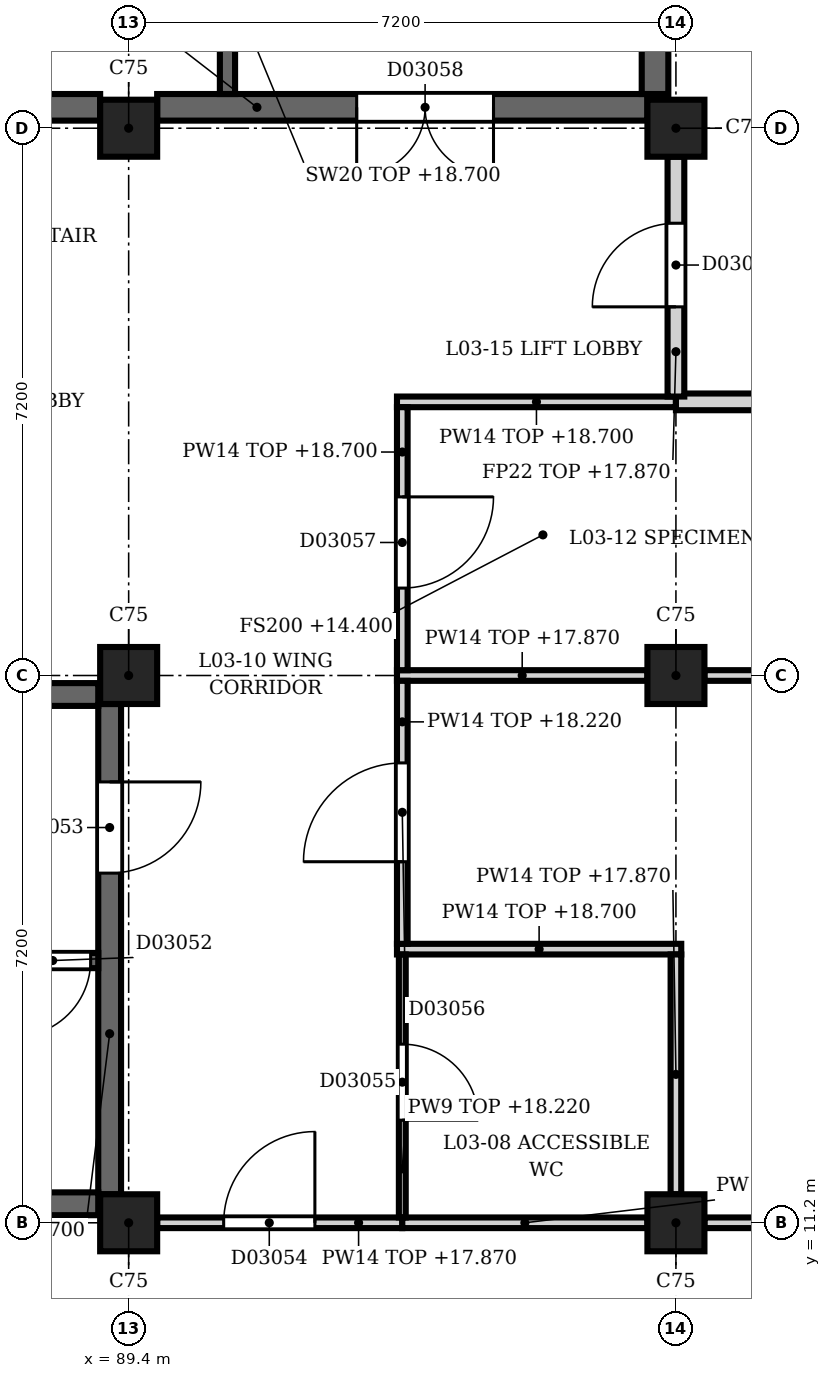
"""IFC4 building model, lengths in metres.
Left out: names, types, materials, properties, quantities, classifications, styles, units other than length and angle.
Written with IfcOpenShell. Run it as: python <this file> out.ifc"""

import sys

from ifc_helpers import new_model, si_unit, direction, frame, frame_2d, origin, origin_2d, place, context, subcontext, project, spatial, rectangle, extrude, element, fill, save


model = new_model("IFC4")
c1 = context("Model", 3, precision=1e-05, world=origin(), true_north=direction((0.0, 1.0)))
c2 = subcontext(c1, "Body", "Model", "MODEL_VIEW")
j1 = project(units=[si_unit("LENGTHUNIT", "METRE"), si_unit("PLANEANGLEUNIT", "RADIAN")], contexts=[c1])
p1 = place(None, origin())
s1 = spatial("IfcSite", under=j1, at=p1, CompositionType="ELEMENT")
p2 = place(p1, origin())
s2 = spatial("IfcBuilding", under=s1, at=p2, CompositionType="ELEMENT")
p3 = place(p2, frame((0.0, 0.0, 14.4)))
s3 = spatial("IfcBuildingStorey", under=s2, at=p3, CompositionType="ELEMENT", Elevation=14.4)
for number, where, z_axis, x_axis in (
    (1, (89.4, 11.2, 0.0), (0.0, 0.0, 1.0), (1.0, 0.0, 0.0)),
    (2, (89.4, 18.4, 0.0), (0.0, 0.0, 1.0), (1.0, 0.0, 0.0)),
    (3, (89.4, 25.6, 0.0), (0.0, 0.0, 1.0), (1.0, 0.0, 0.0)),
    (4, (96.6, 11.2, 0.0), (0.0, 0.0, 1.0), (1.0, 0.0, 0.0)),
    (5, (96.6, 18.4, 0.0), (0.0, 0.0, 1.0), (1.0, 0.0, 0.0)),
    (6, (96.6, 25.6, 0.0), (0.0, 0.0, 1.0), (1.0, 0.0, 0.0)),
):
    element("IfcColumn", number, at=place(p3, frame(where, z_axis=z_axis, x_axis=x_axis)), inside=s3, PredefinedType="COLUMN", context=c2, shape_type="SweptSolid", body=[
        extrude(rectangle(XDim=0.75, YDim=0.75, at=origin_2d()), origin(), (0.0, 0.0, 1.0), 4.5),
    ])
p4 = place(p3, frame((82.575, 25.875, 0.0), z_axis=(0.0, 0.0, 1.0), x_axis=(1.0, 0.0, 0.0)))
e7 = element("IfcWall", 7, at=p4, inside=s3, PredefinedType="SHEAR", context=c2, shape_type="SweptSolid", body=[
    extrude(rectangle(XDim=6.45, YDim=0.35, at=frame_2d((3.225, 0.0))), origin(), (0.0, 0.0, 1.0), 4.3),
])
p5 = place(p4, frame((3.825, 0.0, 0.0)))
e8 = element("IfcOpeningElement", 8, at=p5, cuts=e7, PredefinedType="OPENING", context=c2, shape_type="SweptSolid", body=[
    extrude(rectangle(XDim=1.2, YDim=2.1, at=frame_2d((0.6, 1.05))), frame((0.0, 0.185, 0.0), z_axis=(0.0, -1.0, 0.0), x_axis=(1.0, 0.0, 0.0)), (0.0, 0.0, 1.0), 0.37),
])
p6 = place(p3, frame((89.775, 25.875, 0.0), z_axis=(0.0, 0.0, 1.0), x_axis=(1.0, 0.0, 0.0)))
e9 = element("IfcWall", 9, at=p6, inside=s3, PredefinedType="SHEAR", context=c2, shape_type="SweptSolid", body=[
    extrude(rectangle(XDim=6.45, YDim=0.35, at=frame_2d((3.225, 0.0))), origin(), (0.0, 0.0, 1.0), 4.3),
])
p7 = place(p6, frame((2.625, 0.0, 0.0)))
e10 = element("IfcOpeningElement", 10, at=p7, cuts=e9, PredefinedType="OPENING", context=c2, shape_type="SweptSolid", body=[
    extrude(rectangle(XDim=1.8, YDim=2.1, at=frame_2d((0.9, 1.05))), frame((0.0, 0.185, 0.0), z_axis=(0.0, -1.0, 0.0), x_axis=(1.0, 0.0, 0.0)), (0.0, 0.0, 1.0), 0.37),
])
p8 = place(p3, frame((96.325, 26.05, 0.0), z_axis=(0.0, 0.0, 1.0), x_axis=(0.0, 1.0, 0.0)))
e11 = element("IfcWall", 11, at=p8, inside=s3, PredefinedType="SHEAR", context=c2, shape_type="SweptSolid", body=[
    extrude(rectangle(XDim=6.3, YDim=0.35, at=frame_2d((3.15, 0.0))), origin(), (0.0, 0.0, 1.0), 4.3),
])
p9 = place(p3, frame((90.7, 26.05, 0.0), z_axis=(0.0, 0.0, 1.0), x_axis=(0.0, 1.0, 0.0)))
e12 = element("IfcWall", 12, at=p9, inside=s3, PredefinedType="SHEAR", context=c2, shape_type="SweptSolid", body=[
    extrude(rectangle(XDim=3.05, YDim=0.2, at=frame_2d((1.525, 0.0))), origin(), (0.0, 0.0, 1.0), 4.3),
])
p10 = place(p3, frame((89.15, 11.575, 0.0), z_axis=(0.0, 0.0, 1.0), x_axis=(0.0, 1.0, 0.0)))
e13 = element("IfcWall", 13, at=p10, inside=s3, PredefinedType="SHEAR", context=c2, shape_type="SweptSolid", body=[
    extrude(rectangle(XDim=6.45, YDim=0.3, at=frame_2d((3.225, 0.0))), origin(), (0.0, 0.0, 1.0), 4.3),
])
p11 = place(p10, frame((4.225, 0.0, 0.0)))
e14 = element("IfcOpeningElement", 14, at=p11, cuts=e13, PredefinedType="OPENING", context=c2, shape_type="SweptSolid", body=[
    extrude(rectangle(XDim=1.2, YDim=2.1, at=frame_2d((0.6, 1.05))), frame((0.0, 0.16, 0.0), z_axis=(0.0, -1.0, 0.0), x_axis=(1.0, 0.0, 0.0)), (0.0, 0.0, 1.0), 0.32),
])
for number, where, z_axis, x_axis in (
    (15, (82.6, 11.45, 0.0), (0.0, 0.0, 1.0), (1.0, 0.0, 0.0)),
    (16, (82.6, 18.15, 0.0), (0.0, 0.0, 1.0), (1.0, 0.0, 0.0)),
):
    element("IfcWall", number, at=place(p3, frame(where, z_axis=z_axis, x_axis=x_axis)), inside=s3, PredefinedType="SHEAR", context=c2, shape_type="SweptSolid", body=[
        extrude(rectangle(XDim=6.4, YDim=0.3, at=frame_2d((3.2, 0.0))), origin(), (0.0, 0.0, 1.0), 4.3),
    ])
p12 = place(p3, frame((89.0, 14.65, 0.0), z_axis=(0.0, 0.0, 1.0), x_axis=(-1.0, 0.0, 0.0)))
e17 = element("IfcWall", 17, at=p12, inside=s3, PredefinedType="SHEAR", context=c2, shape_type="SweptSolid", body=[
    extrude(rectangle(XDim=6.4, YDim=0.2, at=frame_2d((3.2, 0.0))), origin(), (0.0, 0.0, 1.0), 4.3),
])
p13 = place(p12, frame((0.1, 0.0, 0.0)))
e18 = element("IfcOpeningElement", 18, at=p13, cuts=e17, PredefinedType="OPENING", context=c2, shape_type="SweptSolid", body=[
    extrude(rectangle(XDim=1.0, YDim=2.1, at=frame_2d((0.5, 1.05))), frame((0.0, 0.11, 0.0), z_axis=(0.0, -1.0, 0.0), x_axis=(1.0, 0.0, 0.0)), (0.0, 0.0, 1.0), 0.22),
])
p14 = place(p3, frame((93.0, 11.2, 0.0), z_axis=(0.0, 0.0, 1.0), x_axis=(-1.0, 0.0, 0.0)))
e19 = element("IfcWall", 19, at=p14, inside=s3, PredefinedType="PARTITIONING", context=c2, shape_type="SweptSolid", body=[
    extrude(rectangle(XDim=3.225, YDim=0.14, at=frame_2d((1.613, 0.0))), origin(), (0.0, 0.0, 1.0), 3.47),
])
p15 = place(p14, frame((1.15, 0.0, 0.0)))
e20 = element("IfcOpeningElement", 20, at=p15, cuts=e19, PredefinedType="OPENING", context=c2, shape_type="SweptSolid", body=[
    extrude(rectangle(XDim=1.2, YDim=2.1, at=frame_2d((0.6, 1.05))), frame((0.0, 0.08, 0.0), z_axis=(0.0, -1.0, 0.0), x_axis=(1.0, 0.0, 0.0)), (0.0, 0.0, 1.0), 0.16),
])
p16 = place(p3, frame((93.0, 11.2, 0.0), z_axis=(0.0, 0.0, 1.0), x_axis=(1.0, 0.0, 0.0)))
e21 = element("IfcWall", 21, at=p16, inside=s3, PredefinedType="PARTITIONING", context=c2, shape_type="SweptSolid", body=[
    extrude(rectangle(XDim=3.225, YDim=0.14, at=frame_2d((1.613, 0.0))), origin(), (0.0, 0.0, 1.0), 3.47),
])
p17 = place(p3, frame((96.975, 11.2, 0.0), z_axis=(0.0, 0.0, 1.0), x_axis=(1.0, 0.0, 0.0)))
e22 = element("IfcWall", 22, at=p17, inside=s3, PredefinedType="PARTITIONING", context=c2, shape_type="SweptSolid", body=[
    extrude(rectangle(XDim=6.475, YDim=0.14, at=frame_2d((3.237, 0.0))), origin(), (0.0, 0.0, 1.0), 3.47),
])
p18 = place(p3, frame((92.93, 14.8, 0.0), z_axis=(0.0, 0.0, 1.0), x_axis=(1.0, 0.0, 0.0)))
e23 = element("IfcWall", 23, at=p18, inside=s3, PredefinedType="PARTITIONING", context=c2, shape_type="SweptSolid", body=[
    extrude(rectangle(XDim=3.74, YDim=0.14, at=frame_2d((1.87, 0.0))), origin(), (0.0, 0.0, 1.0), 4.3),
])
p19 = place(p3, frame((92.93, 18.4, 0.0), z_axis=(0.0, 0.0, 1.0), x_axis=(1.0, 0.0, 0.0)))
e24 = element("IfcWall", 24, at=p19, inside=s3, PredefinedType="PARTITIONING", context=c2, shape_type="SweptSolid", body=[
    extrude(rectangle(XDim=3.295, YDim=0.14, at=frame_2d((1.647, 0.0))), origin(), (0.0, 0.0, 1.0), 3.47),
])
p20 = place(p3, frame((96.975, 18.4, 0.0), z_axis=(0.0, 0.0, 1.0), x_axis=(1.0, 0.0, 0.0)))
e25 = element("IfcWall", 25, at=p20, inside=s3, PredefinedType="PARTITIONING", context=c2, shape_type="SweptSolid", body=[
    extrude(rectangle(XDim=6.475, YDim=0.14, at=frame_2d((3.237, 0.0))), origin(), (0.0, 0.0, 1.0), 3.47),
])
p21 = place(p3, frame((92.93, 22.0, 0.0), z_axis=(0.0, 0.0, 1.0), x_axis=(1.0, 0.0, 0.0)))
e26 = element("IfcWall", 26, at=p21, inside=s3, PredefinedType="PARTITIONING", context=c2, shape_type="SweptSolid", body=[
    extrude(rectangle(XDim=3.67, YDim=0.14, at=frame_2d((1.835, 0.0))), origin(), (0.0, 0.0, 1.0), 4.3),
])
p22 = place(p3, frame((96.6, 22.0, 0.0), z_axis=(0.0, 0.0, 1.0), x_axis=(1.0, 0.0, 0.0)))
e27 = element("IfcWall", 27, at=p22, inside=s3, PredefinedType="PARTITIONING", context=c2, shape_type="SweptSolid", body=[
    extrude(rectangle(XDim=7.1, YDim=0.22, at=frame_2d((3.55, 0.0))), origin(), (0.0, 0.0, 1.0), 4.3),
])
p23 = place(p3, frame((93.0, 14.73, 0.0), z_axis=(0.0, 0.0, 1.0), x_axis=(0.0, -1.0, 0.0)))
e28 = element("IfcWall", 28, at=p23, inside=s3, PredefinedType="PARTITIONING", context=c2, shape_type="SweptSolid", body=[
    extrude(rectangle(XDim=3.46, YDim=0.09, at=frame_2d((1.73, 0.0))), origin(), (0.0, 0.0, 1.0), 3.82),
])
p24 = place(p23, frame((1.18, 0.0, 0.0)))
e29 = element("IfcOpeningElement", 29, at=p24, cuts=e28, PredefinedType="OPENING", context=c2, shape_type="SweptSolid", body=[
    extrude(rectangle(XDim=1.0, YDim=2.2, at=frame_2d((0.5, 1.1))), frame((0.0, 0.055, 0.0), z_axis=(0.0, -1.0, 0.0), x_axis=(1.0, 0.0, 0.0)), (0.0, 0.0, 1.0), 0.11),
])
p25 = place(p3, frame((93.0, 18.33, 0.0), z_axis=(0.0, 0.0, 1.0), x_axis=(0.0, -1.0, 0.0)))
e30 = element("IfcWall", 30, at=p25, inside=s3, PredefinedType="PARTITIONING", context=c2, shape_type="SweptSolid", body=[
    extrude(rectangle(XDim=3.46, YDim=0.14, at=frame_2d((1.73, 0.0))), origin(), (0.0, 0.0, 1.0), 3.82),
])
p26 = place(p25, frame((1.08, 0.0, 0.0)))
e31 = element("IfcOpeningElement", 31, at=p26, cuts=e30, PredefinedType="OPENING", context=c2, shape_type="SweptSolid", body=[
    extrude(rectangle(XDim=1.3, YDim=2.1, at=frame_2d((0.65, 1.05))), frame((0.0, 0.08, 0.0), z_axis=(0.0, -1.0, 0.0), x_axis=(1.0, 0.0, 0.0)), (0.0, 0.0, 1.0), 0.16),
])
p27 = place(p3, frame((93.0, 21.93, 0.0), z_axis=(0.0, 0.0, 1.0), x_axis=(0.0, -1.0, 0.0)))
e32 = element("IfcWall", 32, at=p27, inside=s3, PredefinedType="PARTITIONING", context=c2, shape_type="SweptSolid", body=[
    extrude(rectangle(XDim=3.46, YDim=0.14, at=frame_2d((1.73, 0.0))), origin(), (0.0, 0.0, 1.0), 4.3),
])
p28 = place(p27, frame((1.18, 0.0, 0.0)))
e33 = element("IfcOpeningElement", 33, at=p28, cuts=e32, PredefinedType="OPENING", context=c2, shape_type="SweptSolid", body=[
    extrude(rectangle(XDim=1.2, YDim=2.1, at=frame_2d((0.6, 1.05))), frame((0.0, 0.08, 0.0), z_axis=(0.0, -1.0, 0.0), x_axis=(1.0, 0.0, 0.0)), (0.0, 0.0, 1.0), 0.16),
])
p29 = place(p3, frame((96.6, 11.575, 0.0), z_axis=(0.0, 0.0, 1.0), x_axis=(0.0, 1.0, 0.0)))
e34 = element("IfcWall", 34, at=p29, inside=s3, PredefinedType="PARTITIONING", context=c2, shape_type="SweptSolid", body=[
    extrude(rectangle(XDim=3.155, YDim=0.14, at=frame_2d((1.578, 0.0))), origin(), (0.0, 0.0, 1.0), 3.47),
])
p30 = place(p3, frame((96.6, 25.225, 0.0), z_axis=(0.0, 0.0, 1.0), x_axis=(0.0, -1.0, 0.0)))
e35 = element("IfcWall", 35, at=p30, inside=s3, PredefinedType="PARTITIONING", context=c2, shape_type="SweptSolid", body=[
    extrude(rectangle(XDim=3.155, YDim=0.22, at=frame_2d((1.578, 0.0))), origin(), (0.0, 0.0, 1.0), 3.47),
])
p31 = place(p30, frame((0.875, 0.0, 0.0)))
e36 = element("IfcOpeningElement", 36, at=p31, cuts=e35, PredefinedType="OPENING", context=c2, shape_type="SweptSolid", body=[
    extrude(rectangle(XDim=1.1, YDim=2.3, at=frame_2d((0.55, 1.15))), frame((0.0, 0.12, 0.0), z_axis=(0.0, -1.0, 0.0), x_axis=(1.0, 0.0, 0.0)), (0.0, 0.0, 1.0), 0.24),
])
p32 = place(p7, origin())
e37 = element("IfcDoor", 37, at=p32, inside=s3, OperationType="SINGLE_SWING_LEFT", PredefinedType="DOOR", context=c2, shape_type="SweptSolid", body=[
    extrude(rectangle(XDim=1.8, YDim=2.1, at=frame_2d((0.9, 1.05))), frame((0.0, 0.025, 0.0), z_axis=(0.0, -1.0, 0.0), x_axis=(1.0, 0.0, 0.0)), (0.0, 0.0, 1.0), 0.05),
])
fill(e10, e37)
p33 = place(p11, origin())
e38 = element("IfcDoor", 38, at=p33, inside=s3, OperationType="SINGLE_SWING_RIGHT", PredefinedType="DOOR", context=c2, shape_type="SweptSolid", body=[
    extrude(rectangle(XDim=1.2, YDim=2.1, at=frame_2d((0.6, 1.05))), frame((0.0, 0.025, 0.0), z_axis=(0.0, -1.0, 0.0), x_axis=(1.0, 0.0, 0.0)), (0.0, 0.0, 1.0), 0.05),
])
fill(e14, e38)
p34 = place(p13, origin())
e39 = element("IfcDoor", 39, at=p34, inside=s3, OperationType="SINGLE_SWING_LEFT", PredefinedType="DOOR", context=c2, shape_type="SweptSolid", body=[
    extrude(rectangle(XDim=1.0, YDim=2.1, at=frame_2d((0.5, 1.05))), frame((0.0, 0.025, 0.0), z_axis=(0.0, -1.0, 0.0), x_axis=(1.0, 0.0, 0.0)), (0.0, 0.0, 1.0), 0.05),
])
fill(e18, e39)
p35 = place(p15, origin())
e40 = element("IfcDoor", 40, at=p35, inside=s3, OperationType="SINGLE_SWING_RIGHT", PredefinedType="DOOR", context=c2, shape_type="SweptSolid", body=[
    extrude(rectangle(XDim=1.2, YDim=2.1, at=frame_2d((0.6, 1.05))), frame((0.0, 0.025, 0.0), z_axis=(0.0, -1.0, 0.0), x_axis=(1.0, 0.0, 0.0)), (0.0, 0.0, 1.0), 0.05),
])
fill(e20, e40)
p36 = place(p24, origin())
e41 = element("IfcDoor", 41, at=p36, inside=s3, OperationType="SINGLE_SWING_LEFT", PredefinedType="DOOR", context=c2, shape_type="SweptSolid", body=[
    extrude(rectangle(XDim=1.0, YDim=2.2, at=frame_2d((0.5, 1.1))), frame((0.0, 0.025, 0.0), z_axis=(0.0, -1.0, 0.0), x_axis=(1.0, 0.0, 0.0)), (0.0, 0.0, 1.0), 0.05),
])
fill(e29, e41)
p37 = place(p26, origin())
e42 = element("IfcDoor", 42, at=p37, inside=s3, OperationType="SINGLE_SWING_LEFT", PredefinedType="DOOR", context=c2, shape_type="SweptSolid", body=[
    extrude(rectangle(XDim=1.3, YDim=2.1, at=frame_2d((0.65, 1.05))), frame((0.0, 0.025, 0.0), z_axis=(0.0, -1.0, 0.0), x_axis=(1.0, 0.0, 0.0)), (0.0, 0.0, 1.0), 0.05),
])
fill(e31, e42)
p38 = place(p28, origin())
e43 = element("IfcDoor", 43, at=p38, inside=s3, OperationType="SINGLE_SWING_RIGHT", PredefinedType="DOOR", context=c2, shape_type="SweptSolid", body=[
    extrude(rectangle(XDim=1.2, YDim=2.1, at=frame_2d((0.6, 1.05))), frame((0.0, 0.025, 0.0), z_axis=(0.0, -1.0, 0.0), x_axis=(1.0, 0.0, 0.0)), (0.0, 0.0, 1.0), 0.05),
])
fill(e33, e43)
p39 = place(p31, origin())
e44 = element("IfcDoor", 44, at=p39, inside=s3, OperationType="SINGLE_SWING_LEFT", PredefinedType="DOOR", context=c2, shape_type="SweptSolid", body=[
    extrude(rectangle(XDim=1.1, YDim=2.3, at=frame_2d((0.55, 1.15))), frame((0.0, 0.025, 0.0), z_axis=(0.0, -1.0, 0.0), x_axis=(1.0, 0.0, 0.0)), (0.0, 0.0, 1.0), 0.05),
])
fill(e36, e44)
save(model, sys.argv[1])
